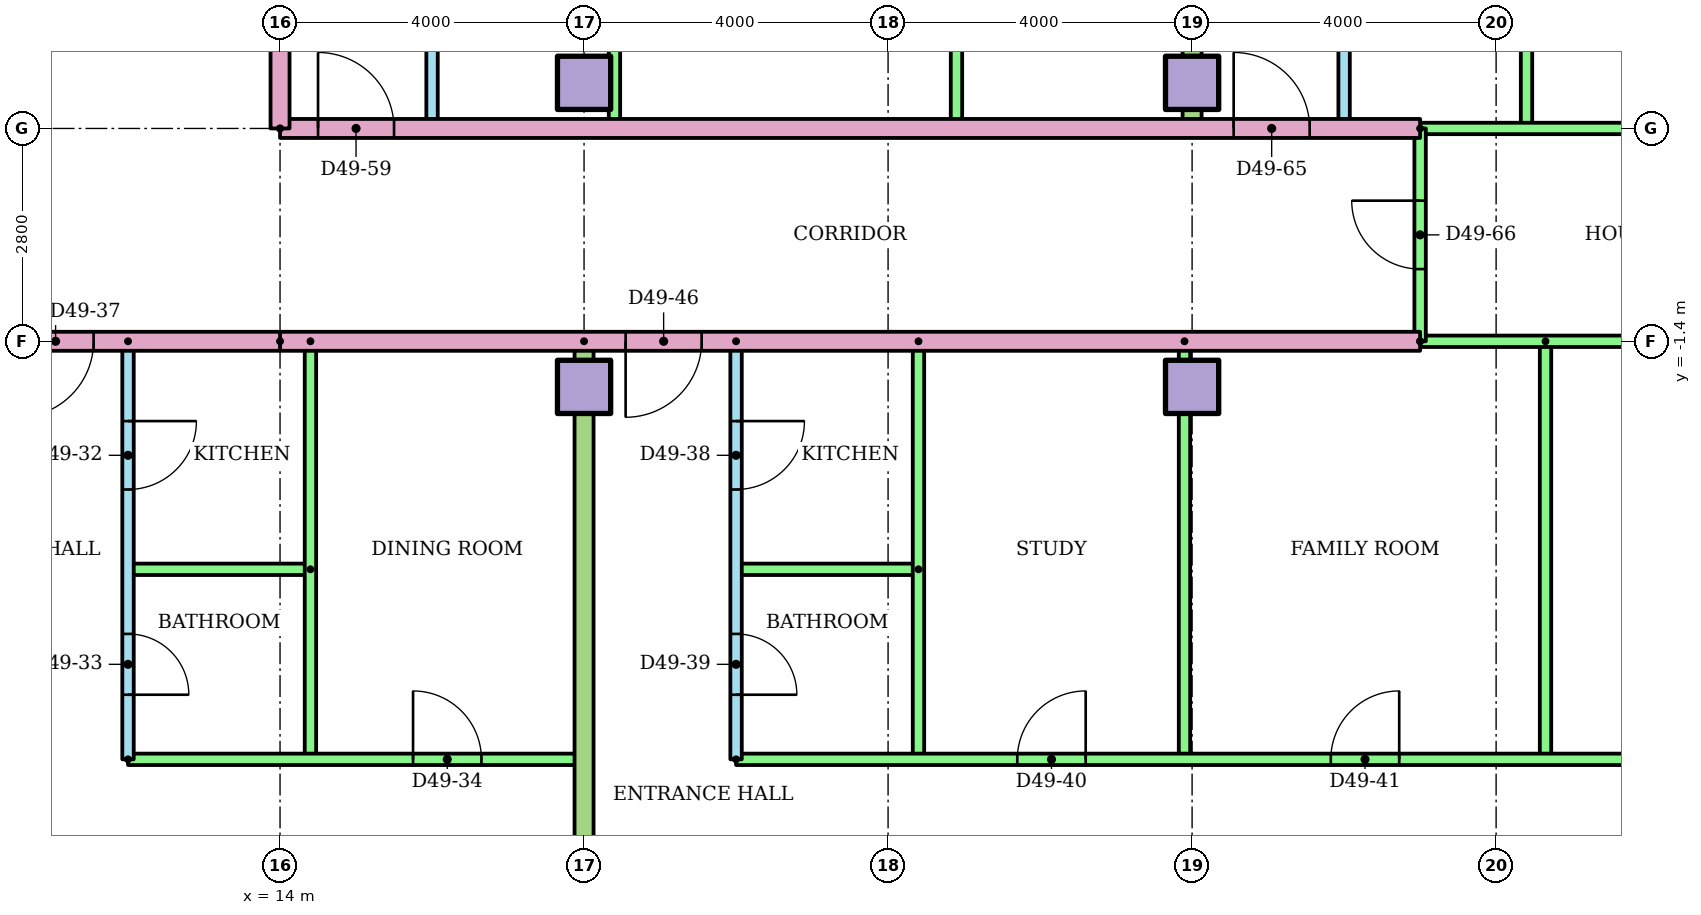
"""IFC4 building model, lengths in metres.
Left out: names, types, materials, properties, quantities, classifications, styles, units other than length and angle.
Written with IfcOpenShell. Run it as: python <this file> out.ifc"""

import sys

from ifc_helpers import new_model, si_unit, direction, frame, frame_2d, origin, origin_2d, place, context, subcontext, project, spatial, rectangle, extrude, element, fill, save


model = new_model("IFC4")
c1 = context("Model", 3, precision=1e-05, world=origin(), true_north=direction((0.0, 1.0)))
c2 = subcontext(c1, "Body", "Model", "MODEL_VIEW")
j1 = project(units=[si_unit("LENGTHUNIT", "METRE"), si_unit("PLANEANGLEUNIT", "RADIAN")], contexts=[c1])
p1 = place(None, origin())
s1 = spatial("IfcSite", under=j1, at=p1, CompositionType="ELEMENT")
p2 = place(p1, origin())
s2 = spatial("IfcBuilding", under=s1, at=p2, CompositionType="ELEMENT")
p3 = place(p2, frame((0.0, 0.0, 187.7)))
s3 = spatial("IfcBuildingStorey", under=s2, at=p3, CompositionType="ELEMENT", Elevation=187.7)
for number, where in (
    (1, (18.0, -2.0, 0.0)),
    (2, (26.0, -2.0, 0.0)),
    (3, (18.0, 2.0, 0.0)),
    (4, (26.0, 2.0, 0.0)),
):
    element("IfcColumn", number, at=place(p3, frame(where)), inside=s3, PredefinedType="COLUMN", context=c2, shape_type="SweptSolid", body=[
        extrude(rectangle(XDim=0.7, YDim=0.7, at=origin_2d()), origin(), (0.0, 0.0, 1.0), 3.2),
    ])
p4 = place(p3, frame((12.0, -1.4, 0.0), z_axis=(0.0, 0.0, 1.0), x_axis=(0.0, -1.0, 0.0)))
e5 = element("IfcWall", 5, at=p4, inside=s3, PredefinedType="PARTITIONING", context=c2, shape_type="SweptSolid", body=[
    extrude(rectangle(XDim=5.5, YDim=0.15, at=frame_2d((2.75, 0.0))), origin(), (0.0, 0.0, 1.0), 2.4),
])
p5 = place(p4, frame((1.05, 0.0, 0.0)))
e6 = element("IfcOpeningElement", 6, at=p5, cuts=e5, PredefinedType="OPENING", context=c2, shape_type="SweptSolid", body=[
    extrude(rectangle(XDim=0.9, YDim=2.1, at=frame_2d((0.45, 1.05))), frame((0.0, 0.085, 0.0), z_axis=(0.0, -1.0, 0.0), x_axis=(1.0, 0.0, 0.0)), (0.0, 0.0, 1.0), 0.17),
])
p6 = place(p4, frame((3.85, 0.0, 0.0)))
e7 = element("IfcOpeningElement", 7, at=p6, cuts=e5, PredefinedType="OPENING", context=c2, shape_type="SweptSolid", body=[
    extrude(rectangle(XDim=0.8, YDim=2.1, at=frame_2d((0.4, 1.05))), frame((0.0, 0.085, 0.0), z_axis=(0.0, -1.0, 0.0), x_axis=(1.0, 0.0, 0.0)), (0.0, 0.0, 1.0), 0.17),
])
p7 = place(p3, frame((14.4, -4.4, 0.0), z_axis=(0.0, 0.0, 1.0), x_axis=(-1.0, 0.0, 0.0)))
e8 = element("IfcWall", 8, at=p7, inside=s3, PredefinedType="PARTITIONING", context=c2, shape_type="SweptSolid", body=[
    extrude(rectangle(XDim=2.4, YDim=0.15, at=frame_2d((1.2, 0.0))), origin(), (0.0, 0.0, 1.0), 2.4),
])
p8 = place(p3, frame((14.4, -1.4, 0.0), z_axis=(0.0, 0.0, 1.0), x_axis=(0.0, -1.0, 0.0)))
e9 = element("IfcWall", 9, at=p8, inside=s3, PredefinedType="PARTITIONING", context=c2, shape_type="SweptSolid", body=[
    extrude(rectangle(XDim=5.5, YDim=0.15, at=frame_2d((2.75, 0.0))), origin(), (0.0, 0.0, 1.0), 2.4),
])
p9 = place(p3, frame((12.0, -6.9, 0.0)))
e10 = element("IfcWall", 10, at=p9, inside=s3, PredefinedType="PARTITIONING", context=c2, shape_type="SweptSolid", body=[
    extrude(rectangle(XDim=6.0, YDim=0.15, at=frame_2d((3.0, 0.0))), origin(), (0.0, 0.0, 1.0), 2.4),
])
p10 = place(p9, frame((3.75, 0.0, 0.0)))
e11 = element("IfcOpeningElement", 11, at=p10, cuts=e10, PredefinedType="OPENING", context=c2, shape_type="SweptSolid", body=[
    extrude(rectangle(XDim=0.9, YDim=2.1, at=frame_2d((0.45, 1.05))), frame((0.0, 0.085, 0.0), z_axis=(0.0, -1.0, 0.0), x_axis=(1.0, 0.0, 0.0)), (0.0, 0.0, 1.0), 0.17),
])
p11 = place(p3, frame((20.0, -1.4, 0.0), z_axis=(0.0, 0.0, 1.0), x_axis=(0.0, -1.0, 0.0)))
e12 = element("IfcWall", 12, at=p11, inside=s3, PredefinedType="PARTITIONING", context=c2, shape_type="SweptSolid", body=[
    extrude(rectangle(XDim=5.5, YDim=0.15, at=frame_2d((2.75, 0.0))), origin(), (0.0, 0.0, 1.0), 2.4),
])
p12 = place(p11, frame((1.05, 0.0, 0.0)))
e13 = element("IfcOpeningElement", 13, at=p12, cuts=e12, PredefinedType="OPENING", context=c2, shape_type="SweptSolid", body=[
    extrude(rectangle(XDim=0.9, YDim=2.1, at=frame_2d((0.45, 1.05))), frame((0.0, 0.085, 0.0), z_axis=(0.0, -1.0, 0.0), x_axis=(1.0, 0.0, 0.0)), (0.0, 0.0, 1.0), 0.17),
])
p13 = place(p11, frame((3.85, 0.0, 0.0)))
e14 = element("IfcOpeningElement", 14, at=p13, cuts=e12, PredefinedType="OPENING", context=c2, shape_type="SweptSolid", body=[
    extrude(rectangle(XDim=0.8, YDim=2.1, at=frame_2d((0.4, 1.05))), frame((0.0, 0.085, 0.0), z_axis=(0.0, -1.0, 0.0), x_axis=(1.0, 0.0, 0.0)), (0.0, 0.0, 1.0), 0.17),
])
p14 = place(p3, frame((22.4, -4.4, 0.0), z_axis=(0.0, 0.0, 1.0), x_axis=(-1.0, 0.0, 0.0)))
e15 = element("IfcWall", 15, at=p14, inside=s3, PredefinedType="PARTITIONING", context=c2, shape_type="SweptSolid", body=[
    extrude(rectangle(XDim=2.4, YDim=0.15, at=frame_2d((1.2, 0.0))), origin(), (0.0, 0.0, 1.0), 2.4),
])
for number, where, z_axis, x_axis in (
    (16, (22.4, -1.4, 0.0), (0.0, 0.0, 1.0), (0.0, -1.0, 0.0)),
    (17, (25.9, -1.4, 0.0), (0.0, 0.0, 1.0), (0.0, -1.0, 0.0)),
    (18, (30.65, -1.4, 0.0), (0.0, 0.0, 1.0), (0.0, -1.0, 0.0)),
):
    element("IfcWall", number, at=place(p3, frame(where, z_axis=z_axis, x_axis=x_axis)), inside=s3, PredefinedType="PARTITIONING", context=c2, shape_type="SweptSolid", body=[
        extrude(rectangle(XDim=5.5, YDim=0.15, at=frame_2d((2.75, 0.0))), origin(), (0.0, 0.0, 1.0), 2.4),
    ])
p15 = place(p3, frame((20.0, -6.9, 0.0)))
e19 = element("IfcWall", 19, at=p15, inside=s3, PredefinedType="PARTITIONING", context=c2, shape_type="SweptSolid", body=[
    extrude(rectangle(XDim=16.82, YDim=0.15, at=frame_2d((8.41, 0.0))), origin(), (0.0, 0.0, 1.0), 2.4),
])
p16 = place(p15, frame((3.7, 0.0, 0.0)))
e20 = element("IfcOpeningElement", 20, at=p16, cuts=e19, PredefinedType="OPENING", context=c2, shape_type="SweptSolid", body=[
    extrude(rectangle(XDim=0.9, YDim=2.1, at=frame_2d((0.45, 1.05))), frame((0.0, 0.085, 0.0), z_axis=(0.0, -1.0, 0.0), x_axis=(1.0, 0.0, 0.0)), (0.0, 0.0, 1.0), 0.17),
])
p17 = place(p15, frame((7.825, 0.0, 0.0)))
e21 = element("IfcOpeningElement", 21, at=p17, cuts=e19, PredefinedType="OPENING", context=c2, shape_type="SweptSolid", body=[
    extrude(rectangle(XDim=0.9, YDim=2.1, at=frame_2d((0.45, 1.05))), frame((0.0, 0.085, 0.0), z_axis=(0.0, -1.0, 0.0), x_axis=(1.0, 0.0, 0.0)), (0.0, 0.0, 1.0), 0.17),
])
p18 = place(p15, frame((13.175, 0.0, 0.0)))
e22 = element("IfcOpeningElement", 22, at=p18, cuts=e19, PredefinedType="OPENING", context=c2, shape_type="SweptSolid", body=[
    extrude(rectangle(XDim=0.9, YDim=2.1, at=frame_2d((0.45, 1.05))), frame((0.0, 0.085, 0.0), z_axis=(0.0, -1.0, 0.0), x_axis=(1.0, 0.0, 0.0)), (0.0, 0.0, 1.0), 0.17),
])
p19 = place(p3, frame((18.0, -1.4, 0.0), z_axis=(0.0, 0.0, 1.0), x_axis=(0.0, -1.0, 0.0)))
e23 = element("IfcWall", 23, at=p19, inside=s3, PredefinedType="PARTITIONING", context=c2, shape_type="SweptSolid", body=[
    extrude(rectangle(XDim=15.01, YDim=0.25, at=frame_2d((7.505, 0.0))), origin(), (0.0, 0.0, 1.0), 2.4),
])
p20 = place(p3, frame((29.0, -1.4, 0.0), z_axis=(0.0, 0.0, 1.0), x_axis=(-1.0, 0.0, 0.0)))
e24 = element("IfcWall", 24, at=p20, inside=s3, PredefinedType="PARTITIONING", context=c2, shape_type="SweptSolid", body=[
    extrude(rectangle(XDim=15.0, YDim=0.25, at=frame_2d((7.5, 0.0))), origin(), (0.0, 0.0, 1.0), 2.4),
])
p21 = place(p20, frame((9.453, 0.0, 0.0)))
e25 = element("IfcOpeningElement", 25, at=p21, cuts=e24, PredefinedType="OPENING", context=c2, shape_type="SweptSolid", body=[
    extrude(rectangle(XDim=1.0, YDim=2.1, at=frame_2d((0.5, 1.05))), frame((0.0, 0.135, 0.0), z_axis=(0.0, -1.0, 0.0), x_axis=(1.0, 0.0, 0.0)), (0.0, 0.0, 1.0), 0.27),
])
p22 = place(p3, frame((36.82, -1.4, 0.0), z_axis=(0.0, 0.0, 1.0), x_axis=(-1.0, 0.0, 0.0)))
e26 = element("IfcWall", 26, at=p22, inside=s3, PredefinedType="PARTITIONING", context=c2, shape_type="SweptSolid", body=[
    extrude(rectangle(XDim=7.82, YDim=0.15, at=frame_2d((3.91, 0.0))), origin(), (0.0, 0.0, 1.0), 2.4),
])
p23 = place(p3, frame((16.0, 9.3, 0.0), z_axis=(0.0, 0.0, 1.0), x_axis=(0.0, -1.0, 0.0)))
e27 = element("IfcWall", 27, at=p23, inside=s3, PredefinedType="PARTITIONING", context=c2, shape_type="SweptSolid", body=[
    extrude(rectangle(XDim=7.9, YDim=0.15, at=frame_2d((3.95, 0.0))), origin(), (0.0, 0.0, 1.0), 2.4),
])
p24 = place(p23, frame((5.325, 0.0, 0.0)))
e28 = element("IfcOpeningElement", 28, at=p24, cuts=e27, PredefinedType="OPENING", context=c2, shape_type="SweptSolid", body=[
    extrude(rectangle(XDim=0.9, YDim=2.1, at=frame_2d((0.45, 1.05))), frame((0.0, 0.085, 0.0), z_axis=(0.0, -1.0, 0.0), x_axis=(1.0, 0.0, 0.0)), (0.0, 0.0, 1.0), 0.17),
])
p25 = place(p23, frame((1.425, 0.0, 0.0)))
e29 = element("IfcOpeningElement", 29, at=p25, cuts=e27, PredefinedType="OPENING", context=c2, shape_type="SweptSolid", body=[
    extrude(rectangle(XDim=0.8, YDim=2.1, at=frame_2d((0.4, 1.05))), frame((0.0, 0.085, 0.0), z_axis=(0.0, -1.0, 0.0), x_axis=(1.0, 0.0, 0.0)), (0.0, 0.0, 1.0), 0.17),
])
for number, where, z_axis, x_axis in (
    (30, (18.4, 9.3, 0.0), (0.0, 0.0, 1.0), (0.0, -1.0, 0.0)),
    (31, (22.9, 9.3, 0.0), (0.0, 0.0, 1.0), (0.0, -1.0, 0.0)),
):
    element("IfcWall", number, at=place(p3, frame(where, z_axis=z_axis, x_axis=x_axis)), inside=s3, PredefinedType="PARTITIONING", context=c2, shape_type="SweptSolid", body=[
        extrude(rectangle(XDim=7.9, YDim=0.15, at=frame_2d((3.95, 0.0))), origin(), (0.0, 0.0, 1.0), 2.4),
    ])
p26 = place(p3, frame((28.0, 9.3, 0.0), z_axis=(0.0, 0.0, 1.0), x_axis=(0.0, -1.0, 0.0)))
e32 = element("IfcWall", 32, at=p26, inside=s3, PredefinedType="PARTITIONING", context=c2, shape_type="SweptSolid", body=[
    extrude(rectangle(XDim=7.9, YDim=0.15, at=frame_2d((3.95, 0.0))), origin(), (0.0, 0.0, 1.0), 2.4),
])
p27 = place(p26, frame((5.325, 0.0, 0.0)))
e33 = element("IfcOpeningElement", 33, at=p27, cuts=e32, PredefinedType="OPENING", context=c2, shape_type="SweptSolid", body=[
    extrude(rectangle(XDim=0.9, YDim=2.1, at=frame_2d((0.45, 1.05))), frame((0.0, 0.085, 0.0), z_axis=(0.0, -1.0, 0.0), x_axis=(1.0, 0.0, 0.0)), (0.0, 0.0, 1.0), 0.17),
])
p28 = place(p26, frame((1.425, 0.0, 0.0)))
e34 = element("IfcOpeningElement", 34, at=p28, cuts=e32, PredefinedType="OPENING", context=c2, shape_type="SweptSolid", body=[
    extrude(rectangle(XDim=0.8, YDim=2.1, at=frame_2d((0.4, 1.05))), frame((0.0, 0.085, 0.0), z_axis=(0.0, -1.0, 0.0), x_axis=(1.0, 0.0, 0.0)), (0.0, 0.0, 1.0), 0.17),
])
p29 = place(p3, frame((30.4, 9.3, 0.0), z_axis=(0.0, 0.0, 1.0), x_axis=(0.0, -1.0, 0.0)))
e35 = element("IfcWall", 35, at=p29, inside=s3, PredefinedType="PARTITIONING", context=c2, shape_type="SweptSolid", body=[
    extrude(rectangle(XDim=7.9, YDim=0.15, at=frame_2d((3.95, 0.0))), origin(), (0.0, 0.0, 1.0), 2.4),
])
p30 = place(p3, frame((26.0, 18.821, 0.0), z_axis=(0.0, 0.0, 1.0), x_axis=(0.0, -1.0, 0.0)))
e36 = element("IfcWall", 36, at=p30, inside=s3, PredefinedType="PARTITIONING", context=c2, shape_type="SweptSolid", body=[
    extrude(rectangle(XDim=17.421, YDim=0.25, at=frame_2d((8.71, 0.0))), origin(), (0.0, 0.0, 1.0), 2.4),
])
p31 = place(p3, frame((14.0, 1.4, 0.0)))
e37 = element("IfcWall", 37, at=p31, inside=s3, PredefinedType="PARTITIONING", context=c2, shape_type="SweptSolid", body=[
    extrude(rectangle(XDim=15.0, YDim=0.25, at=frame_2d((7.5, 0.0))), origin(), (0.0, 0.0, 1.0), 2.4),
])
p32 = place(p31, frame((0.5, 0.0, 0.0)))
e38 = element("IfcOpeningElement", 38, at=p32, cuts=e37, PredefinedType="OPENING", context=c2, shape_type="SweptSolid", body=[
    extrude(rectangle(XDim=1.0, YDim=2.1, at=frame_2d((0.5, 1.05))), frame((0.0, 0.135, 0.0), z_axis=(0.0, -1.0, 0.0), x_axis=(1.0, 0.0, 0.0)), (0.0, 0.0, 1.0), 0.27),
])
p33 = place(p31, frame((12.547, 0.0, 0.0)))
e39 = element("IfcOpeningElement", 39, at=p33, cuts=e37, PredefinedType="OPENING", context=c2, shape_type="SweptSolid", body=[
    extrude(rectangle(XDim=1.0, YDim=2.1, at=frame_2d((0.5, 1.05))), frame((0.0, 0.135, 0.0), z_axis=(0.0, -1.0, 0.0), x_axis=(1.0, 0.0, 0.0)), (0.0, 0.0, 1.0), 0.27),
])
p34 = place(p3, frame((29.0, 1.4, 0.0)))
e40 = element("IfcWall", 40, at=p34, inside=s3, PredefinedType="PARTITIONING", context=c2, shape_type="SweptSolid", body=[
    extrude(rectangle(XDim=7.82, YDim=0.15, at=frame_2d((3.91, 0.0))), origin(), (0.0, 0.0, 1.0), 2.4),
])
p35 = place(p3, frame((29.0, -1.4, 0.0), z_axis=(0.0, 0.0, 1.0), x_axis=(0.0, 1.0, 0.0)))
e41 = element("IfcWall", 41, at=p35, inside=s3, PredefinedType="PARTITIONING", context=c2, shape_type="SweptSolid", body=[
    extrude(rectangle(XDim=2.8, YDim=0.15, at=frame_2d((1.4, 0.0))), origin(), (0.0, 0.0, 1.0), 2.4),
])
p36 = place(p35, frame((0.95, 0.0, 0.0)))
e42 = element("IfcOpeningElement", 42, at=p36, cuts=e41, PredefinedType="OPENING", context=c2, shape_type="SweptSolid", body=[
    extrude(rectangle(XDim=0.9, YDim=2.1, at=frame_2d((0.45, 1.05))), frame((0.0, 0.085, 0.0), z_axis=(0.0, -1.0, 0.0), x_axis=(1.0, 0.0, 0.0)), (0.0, 0.0, 1.0), 0.17),
])
p37 = place(p3, frame((14.0, -1.4, 0.0), z_axis=(0.0, 0.0, 1.0), x_axis=(-1.0, 0.0, 0.0)))
e43 = element("IfcWall", 43, at=p37, inside=s3, PredefinedType="PARTITIONING", context=c2, shape_type="SweptSolid", body=[
    extrude(rectangle(XDim=28.0, YDim=0.25, at=frame_2d((14.0, 0.0))), origin(), (0.0, 0.0, 1.0), 2.4),
])
p38 = place(p37, frame((4.547, 0.0, 0.0)))
e44 = element("IfcOpeningElement", 44, at=p38, cuts=e43, PredefinedType="OPENING", context=c2, shape_type="SweptSolid", body=[
    extrude(rectangle(XDim=1.0, YDim=2.1, at=frame_2d((0.5, 1.05))), frame((0.0, 0.135, 0.0), z_axis=(0.0, -1.0, 0.0), x_axis=(1.0, 0.0, 0.0)), (0.0, 0.0, 1.0), 0.27),
])
p39 = place(p37, frame((2.453, 0.0, 0.0)))
e45 = element("IfcOpeningElement", 45, at=p39, cuts=e43, PredefinedType="OPENING", context=c2, shape_type="SweptSolid", body=[
    extrude(rectangle(XDim=1.0, YDim=2.1, at=frame_2d((0.5, 1.05))), frame((0.0, 0.135, 0.0), z_axis=(0.0, -1.0, 0.0), x_axis=(1.0, 0.0, 0.0)), (0.0, 0.0, 1.0), 0.27),
])
p40 = place(p3, frame((14.0, 1.4, 0.0), z_axis=(0.0, 0.0, 1.0), x_axis=(0.0, 1.0, 0.0)))
e46 = element("IfcWall", 46, at=p40, inside=s3, PredefinedType="PARTITIONING", context=c2, shape_type="SweptSolid", body=[
    extrude(rectangle(XDim=1.6, YDim=0.25, at=frame_2d((0.8, 0.0))), origin(), (0.0, 0.0, 1.0), 2.4),
])
p41 = place(p5, origin())
e47 = element("IfcDoor", 47, at=p41, inside=s3, OperationType="SINGLE_SWING_LEFT", PredefinedType="DOOR", context=c2, shape_type="SweptSolid", body=[
    extrude(rectangle(XDim=0.9, YDim=2.1, at=frame_2d((0.45, 1.05))), frame((0.0, 0.025, 0.0), z_axis=(0.0, -1.0, 0.0), x_axis=(1.0, 0.0, 0.0)), (0.0, 0.0, 1.0), 0.05),
])
fill(e6, e47)
p42 = place(p6, origin())
e48 = element("IfcDoor", 48, at=p42, inside=s3, OperationType="SINGLE_SWING_RIGHT", PredefinedType="DOOR", context=c2, shape_type="SweptSolid", body=[
    extrude(rectangle(XDim=0.8, YDim=2.1, at=frame_2d((0.4, 1.05))), frame((0.0, 0.025, 0.0), z_axis=(0.0, -1.0, 0.0), x_axis=(1.0, 0.0, 0.0)), (0.0, 0.0, 1.0), 0.05),
])
fill(e7, e48)
p43 = place(p10, origin())
e49 = element("IfcDoor", 49, at=p43, inside=s3, OperationType="SINGLE_SWING_LEFT", PredefinedType="DOOR", context=c2, shape_type="SweptSolid", body=[
    extrude(rectangle(XDim=0.9, YDim=2.1, at=frame_2d((0.45, 1.05))), frame((0.0, 0.025, 0.0), z_axis=(0.0, -1.0, 0.0), x_axis=(1.0, 0.0, 0.0)), (0.0, 0.0, 1.0), 0.05),
])
fill(e11, e49)
p44 = place(p39, origin())
e50 = element("IfcDoor", 50, at=p44, inside=s3, OperationType="SINGLE_SWING_RIGHT", PredefinedType="DOOR", context=c2, shape_type="SweptSolid", body=[
    extrude(rectangle(XDim=1.0, YDim=2.1, at=frame_2d((0.5, 1.05))), frame((0.0, 0.025, 0.0), z_axis=(0.0, -1.0, 0.0), x_axis=(1.0, 0.0, 0.0)), (0.0, 0.0, 1.0), 0.05),
])
fill(e45, e50)
p45 = place(p12, origin())
e51 = element("IfcDoor", 51, at=p45, inside=s3, OperationType="SINGLE_SWING_LEFT", PredefinedType="DOOR", context=c2, shape_type="SweptSolid", body=[
    extrude(rectangle(XDim=0.9, YDim=2.1, at=frame_2d((0.45, 1.05))), frame((0.0, 0.025, 0.0), z_axis=(0.0, -1.0, 0.0), x_axis=(1.0, 0.0, 0.0)), (0.0, 0.0, 1.0), 0.05),
])
fill(e13, e51)
p46 = place(p13, origin())
e52 = element("IfcDoor", 52, at=p46, inside=s3, OperationType="SINGLE_SWING_RIGHT", PredefinedType="DOOR", context=c2, shape_type="SweptSolid", body=[
    extrude(rectangle(XDim=0.8, YDim=2.1, at=frame_2d((0.4, 1.05))), frame((0.0, 0.025, 0.0), z_axis=(0.0, -1.0, 0.0), x_axis=(1.0, 0.0, 0.0)), (0.0, 0.0, 1.0), 0.05),
])
fill(e14, e52)
p47 = place(p16, origin())
e53 = element("IfcDoor", 53, at=p47, inside=s3, OperationType="SINGLE_SWING_RIGHT", PredefinedType="DOOR", context=c2, shape_type="SweptSolid", body=[
    extrude(rectangle(XDim=0.9, YDim=2.1, at=frame_2d((0.45, 1.05))), frame((0.0, 0.025, 0.0), z_axis=(0.0, -1.0, 0.0), x_axis=(1.0, 0.0, 0.0)), (0.0, 0.0, 1.0), 0.05),
])
fill(e20, e53)
p48 = place(p17, origin())
e54 = element("IfcDoor", 54, at=p48, inside=s3, OperationType="SINGLE_SWING_RIGHT", PredefinedType="DOOR", context=c2, shape_type="SweptSolid", body=[
    extrude(rectangle(XDim=0.9, YDim=2.1, at=frame_2d((0.45, 1.05))), frame((0.0, 0.025, 0.0), z_axis=(0.0, -1.0, 0.0), x_axis=(1.0, 0.0, 0.0)), (0.0, 0.0, 1.0), 0.05),
])
fill(e21, e54)
p49 = place(p21, origin())
e55 = element("IfcDoor", 55, at=p49, inside=s3, OperationType="SINGLE_SWING_RIGHT", PredefinedType="DOOR", context=c2, shape_type="SweptSolid", body=[
    extrude(rectangle(XDim=1.0, YDim=2.1, at=frame_2d((0.5, 1.05))), frame((0.0, 0.025, 0.0), z_axis=(0.0, -1.0, 0.0), x_axis=(1.0, 0.0, 0.0)), (0.0, 0.0, 1.0), 0.05),
])
fill(e25, e55)
p50 = place(p32, origin())
e56 = element("IfcDoor", 56, at=p50, inside=s3, OperationType="SINGLE_SWING_LEFT", PredefinedType="DOOR", context=c2, shape_type="SweptSolid", body=[
    extrude(rectangle(XDim=1.0, YDim=2.1, at=frame_2d((0.5, 1.05))), frame((0.0, 0.025, 0.0), z_axis=(0.0, -1.0, 0.0), x_axis=(1.0, 0.0, 0.0)), (0.0, 0.0, 1.0), 0.05),
])
fill(e38, e56)
p51 = place(p33, origin())
e57 = element("IfcDoor", 57, at=p51, inside=s3, OperationType="SINGLE_SWING_LEFT", PredefinedType="DOOR", context=c2, shape_type="SweptSolid", body=[
    extrude(rectangle(XDim=1.0, YDim=2.1, at=frame_2d((0.5, 1.05))), frame((0.0, 0.025, 0.0), z_axis=(0.0, -1.0, 0.0), x_axis=(1.0, 0.0, 0.0)), (0.0, 0.0, 1.0), 0.05),
])
fill(e39, e57)
p52 = place(p36, origin())
e58 = element("IfcDoor", 58, at=p52, inside=s3, OperationType="SINGLE_SWING_RIGHT", PredefinedType="DOOR", context=c2, shape_type="SweptSolid", body=[
    extrude(rectangle(XDim=0.9, YDim=2.1, at=frame_2d((0.45, 1.05))), frame((0.0, 0.025, 0.0), z_axis=(0.0, -1.0, 0.0), x_axis=(1.0, 0.0, 0.0)), (0.0, 0.0, 1.0), 0.05),
])
fill(e42, e58)
save(model, sys.argv[1])
